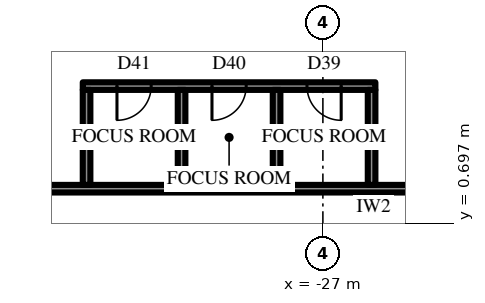
"""IFC4 building model, lengths in metres.
Left out: names, types, materials, properties, quantities, classifications, styles, units other than length and angle.
Written with IfcOpenShell. Run it as: python <this file> out.ifc"""

import sys

from ifc_helpers import new_model, si_unit, direction, frame, frame_2d, origin, place, context, subcontext, project, spatial, rectangle, extrude, element, fill, save


model = new_model("IFC4")
c1 = context("Model", 3, precision=1e-05, world=origin(), true_north=direction((0.0, 1.0)))
c2 = subcontext(c1, "Body", "Model", "MODEL_VIEW")
j1 = project(units=[si_unit("LENGTHUNIT", "METRE"), si_unit("PLANEANGLEUNIT", "RADIAN")], contexts=[c1])
p1 = place(None, origin())
s1 = spatial("IfcSite", under=j1, at=p1, CompositionType="ELEMENT")
p2 = place(p1, origin())
s2 = spatial("IfcBuilding", under=s1, at=p2, CompositionType="ELEMENT")
p3 = place(p2, frame((0.0, 0.0, 57.1)))
s3 = spatial("IfcBuildingStorey", under=s2, at=p3, CompositionType="ELEMENT", Elevation=57.1)
p4 = place(p3, frame((-21.1, 1.6, 0.0), z_axis=(0.0, 0.0, 1.0), x_axis=(-1.0, 0.0, 0.0)))
e1 = element("IfcWall", 1, at=p4, inside=s3, PredefinedType="PARTITIONING", context=c2, shape_type="SweptSolid", body=[
    extrude(rectangle(XDim=15.215, YDim=0.2, at=frame_2d((7.608, 0.0))), origin(), (0.0, 0.0, 1.0), 4.0),
])
p5 = place(p4, frame((1.021, 0.0, 0.0)))
e2 = element("IfcOpeningElement", 2, at=p5, cuts=e1, PredefinedType="OPENING", context=c2, shape_type="SweptSolid", body=[
    extrude(rectangle(XDim=1.0, YDim=2.2, at=frame_2d((0.5, 1.1))), frame((0.0, 0.11, 0.0), z_axis=(0.0, -1.0, 0.0), x_axis=(1.0, 0.0, 0.0)), (0.0, 0.0, 1.0), 0.22),
])
p6 = place(p3, frame((-25.618, 4.3, 0.0), z_axis=(0.0, 0.0, 1.0), x_axis=(-1.0, 0.0, 0.0)))
e3 = element("IfcWall", 3, at=p6, inside=s3, PredefinedType="PARTITIONING", context=c2, shape_type="SweptSolid", body=[
    extrude(rectangle(XDim=7.7, YDim=0.2, at=frame_2d((3.85, 0.0))), origin(), (0.0, 0.0, 1.0), 4.0),
])
p7 = place(p6, frame((0.9, 0.0, 0.0)))
e4 = element("IfcOpeningElement", 4, at=p7, cuts=e3, PredefinedType="OPENING", context=c2, shape_type="SweptSolid", body=[
    extrude(rectangle(XDim=0.9, YDim=2.2, at=frame_2d((0.45, 1.1))), frame((0.0, 0.11, 0.0), z_axis=(0.0, -1.0, 0.0), x_axis=(1.0, 0.0, 0.0)), (0.0, 0.0, 1.0), 0.22),
])
p8 = place(p6, frame((3.4, 0.0, 0.0)))
e5 = element("IfcOpeningElement", 5, at=p8, cuts=e3, PredefinedType="OPENING", context=c2, shape_type="SweptSolid", body=[
    extrude(rectangle(XDim=0.9, YDim=2.2, at=frame_2d((0.45, 1.1))), frame((0.0, 0.11, 0.0), z_axis=(0.0, -1.0, 0.0), x_axis=(1.0, 0.0, 0.0)), (0.0, 0.0, 1.0), 0.22),
])
p9 = place(p6, frame((5.9, 0.0, 0.0)))
e6 = element("IfcOpeningElement", 6, at=p9, cuts=e3, PredefinedType="OPENING", context=c2, shape_type="SweptSolid", body=[
    extrude(rectangle(XDim=0.9, YDim=2.2, at=frame_2d((0.45, 1.1))), frame((0.0, 0.11, 0.0), z_axis=(0.0, -1.0, 0.0), x_axis=(1.0, 0.0, 0.0)), (0.0, 0.0, 1.0), 0.22),
])
for number, where, z_axis, x_axis in (
    (7, (-25.719, 1.7, 0.0), (0.0, 0.0, 1.0), (0.0, 1.0, 0.0)),
    (8, (-28.219, 1.7, 0.0), (0.0, 0.0, 1.0), (0.0, 1.0, 0.0)),
    (9, (-30.719, 1.7, 0.0), (0.0, 0.0, 1.0), (0.0, 1.0, 0.0)),
    (10, (-33.219, 1.7, 0.0), (0.0, 0.0, 1.0), (0.0, 1.0, 0.0)),
):
    element("IfcWall", number, at=place(p3, frame(where, z_axis=z_axis, x_axis=x_axis)), inside=s3, PredefinedType="PARTITIONING", context=c2, shape_type="SweptSolid", body=[
        extrude(rectangle(XDim=2.5, YDim=0.2, at=frame_2d((1.25, 0.0))), origin(), (0.0, 0.0, 1.0), 4.0),
    ])
p10 = place(p7, origin())
e11 = element("IfcDoor", 11, at=p10, inside=s3, OperationType="SINGLE_SWING_RIGHT", PredefinedType="DOOR", context=c2, shape_type="SweptSolid", body=[
    extrude(rectangle(XDim=0.9, YDim=2.2, at=frame_2d((0.45, 1.1))), frame((0.0, 0.025, 0.0), z_axis=(0.0, -1.0, 0.0), x_axis=(1.0, 0.0, 0.0)), (0.0, 0.0, 1.0), 0.05),
])
fill(e4, e11)
p11 = place(p8, origin())
e12 = element("IfcDoor", 12, at=p11, inside=s3, OperationType="SINGLE_SWING_LEFT", PredefinedType="DOOR", context=c2, shape_type="SweptSolid", body=[
    extrude(rectangle(XDim=0.9, YDim=2.2, at=frame_2d((0.45, 1.1))), frame((0.0, 0.025, 0.0), z_axis=(0.0, -1.0, 0.0), x_axis=(1.0, 0.0, 0.0)), (0.0, 0.0, 1.0), 0.05),
])
fill(e5, e12)
p12 = place(p9, origin())
e13 = element("IfcDoor", 13, at=p12, inside=s3, OperationType="SINGLE_SWING_LEFT", PredefinedType="DOOR", context=c2, shape_type="SweptSolid", body=[
    extrude(rectangle(XDim=0.9, YDim=2.2, at=frame_2d((0.45, 1.1))), frame((0.0, 0.025, 0.0), z_axis=(0.0, -1.0, 0.0), x_axis=(1.0, 0.0, 0.0)), (0.0, 0.0, 1.0), 0.05),
])
fill(e6, e13)
save(model, sys.argv[1])
